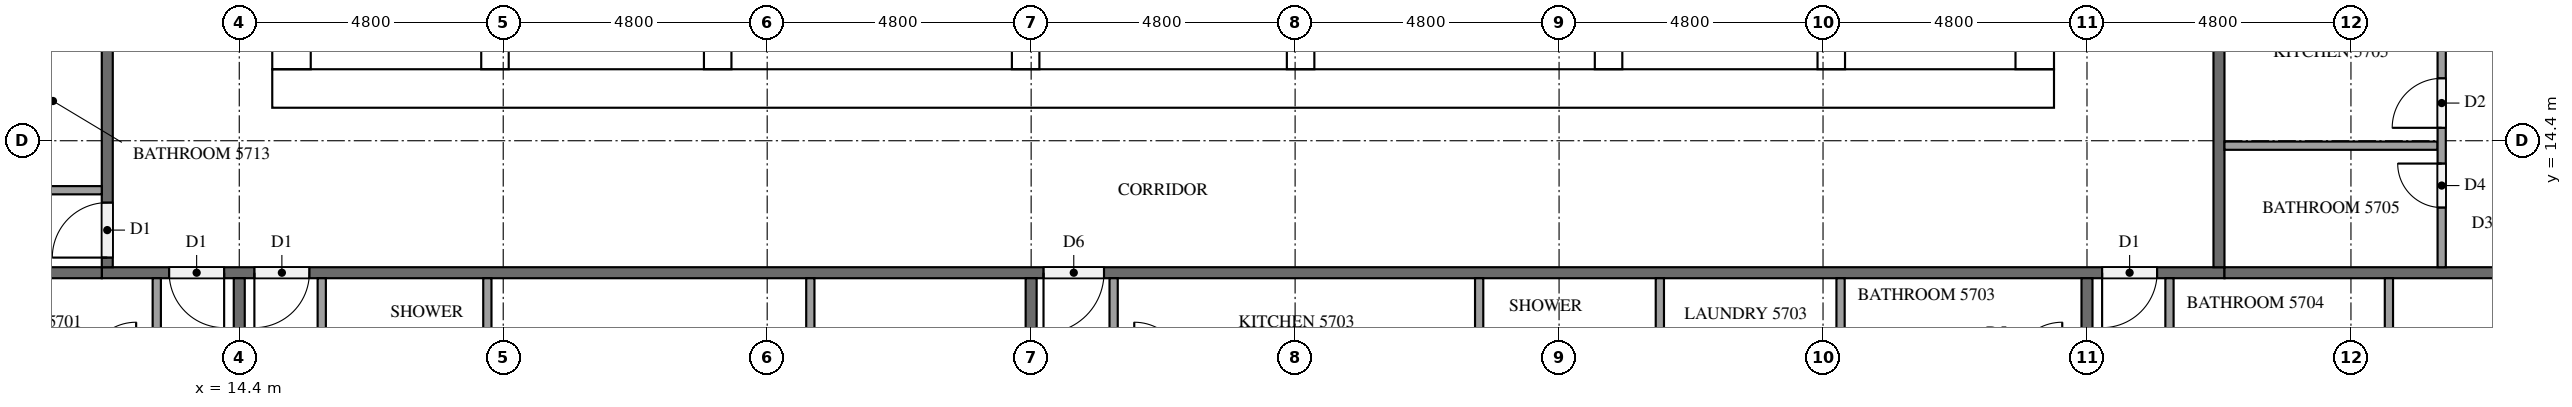
"""IFC4 building model, lengths in metres.
Left out: names, types, materials, properties, quantities, classifications, styles, units other than length and angle.
Written with IfcOpenShell. Run it as: python <this file> out.ifc"""

import sys

from ifc_helpers import new_model, si_unit, direction, frame, frame_2d, origin, place, context, subcontext, project, spatial, rectangle, extrude, element, fill, save


model = new_model("IFC4")
c1 = context("Model", 3, precision=1e-05, world=origin(), true_north=direction((0.0, 1.0)))
c2 = subcontext(c1, "Body", "Model", "MODEL_VIEW")
j1 = project(units=[si_unit("LENGTHUNIT", "METRE"), si_unit("PLANEANGLEUNIT", "RADIAN")], contexts=[c1])
p1 = place(None, origin())
s1 = spatial("IfcSite", under=j1, at=p1, CompositionType="ELEMENT")
p2 = place(p1, origin())
s2 = spatial("IfcBuilding", under=s1, at=p2, CompositionType="ELEMENT")
p3 = place(p2, frame((0.0, 0.0, 219.3)))
s3 = spatial("IfcBuildingStorey", under=s2, at=p3, CompositionType="ELEMENT", Elevation=219.3)
p4 = place(p3, frame((15.0, 15.35, 0.0), z_axis=(0.0, 0.0, 1.0), x_axis=(1.0, 0.0, 0.0)))
e1 = element("IfcWall", 1, at=p4, inside=s3, PredefinedType="SHEAR", context=c2, shape_type="SweptSolid", body=[
    extrude(rectangle(XDim=32.4, YDim=0.7, at=frame_2d((16.2, 0.0))), origin(), (0.0, 0.0, 1.0), 3.2),
])
p5 = place(p4, frame((15.3, 0.0, 0.0)))
e2 = element("IfcOpeningElement", 2, at=p5, cuts=e1, PredefinedType="OPENING", context=c2, shape_type="SweptSolid", body=[
    extrude(rectangle(XDim=1.8, YDim=2.1, at=frame_2d((0.9, 1.05))), frame((0.0, 0.36, 0.0), z_axis=(0.0, -1.0, 0.0), x_axis=(1.0, 0.0, 0.0)), (0.0, 0.0, 1.0), 0.72),
])
p6 = place(p3, frame((15.35, 15.7, 0.0), z_axis=(0.0, 0.0, 1.0), x_axis=(0.0, 1.0, 0.0)))
e3 = element("IfcWall", 3, at=p6, inside=s3, PredefinedType="SHEAR", context=c2, shape_type="SweptSolid", body=[
    extrude(rectangle(XDim=21.4, YDim=0.7, at=frame_2d((10.7, 0.0))), origin(), (0.0, 0.0, 1.0), 3.2),
])
p7 = place(p6, frame((5.06, 0.0, 0.0)))
e4 = element("IfcOpeningElement", 4, at=p7, cuts=e3, PredefinedType="OPENING", context=c2, shape_type="SweptSolid", body=[
    extrude(rectangle(XDim=1.2, YDim=2.1, at=frame_2d((0.6, 1.05))), frame((0.0, 0.36, 0.0), z_axis=(0.0, -1.0, 0.0), x_axis=(1.0, 0.0, 0.0)), (0.0, 0.0, 1.0), 0.72),
])
p8 = place(p3, frame((47.05, 15.7, 0.0), z_axis=(0.0, 0.0, 1.0), x_axis=(0.0, 1.0, 0.0)))
e5 = element("IfcWall", 5, at=p8, inside=s3, PredefinedType="SHEAR", context=c2, shape_type="SweptSolid", body=[
    extrude(rectangle(XDim=21.4, YDim=0.7, at=frame_2d((10.7, 0.0))), origin(), (0.0, 0.0, 1.0), 3.2),
])
p9 = place(p8, frame((10.4, 0.0, 0.0)))
e6 = element("IfcOpeningElement", 6, at=p9, cuts=e5, PredefinedType="OPENING", context=c2, shape_type="SweptSolid", body=[
    extrude(rectangle(XDim=1.2, YDim=2.1, at=frame_2d((0.6, 1.05))), frame((0.0, 0.36, 0.0), z_axis=(0.0, -1.0, 0.0), x_axis=(1.0, 0.0, 0.0)), (0.0, 0.0, 1.0), 0.72),
])
p10 = place(p3, frame((19.05, 15.7, 0.0), z_axis=(0.0, 0.0, 1.0), x_axis=(0.0, 1.0, 0.0)))
e7 = element("IfcWall", 7, at=p10, inside=s3, PredefinedType="SHEAR", context=c2, shape_type="SweptSolid", body=[
    extrude(rectangle(XDim=15.3, YDim=0.5, at=frame_2d((7.65, 0.0))), origin(), (0.0, 0.0, 1.0), 3.2),
])
p11 = place(p10, frame((9.75, 0.0, 0.0)))
e8 = element("IfcOpeningElement", 8, at=p11, cuts=e7, PredefinedType="OPENING", context=c2, shape_type="SweptSolid", body=[
    extrude(rectangle(XDim=1.1, YDim=2.1, at=frame_2d((0.55, 1.05))), frame((0.0, 0.26, 0.0), z_axis=(0.0, -1.0, 0.0), x_axis=(1.0, 0.0, 0.0)), (0.0, 0.0, 1.0), 0.52),
])
p12 = place(p10, frame((13.25, 0.0, 0.0)))
e9 = element("IfcOpeningElement", 9, at=p12, cuts=e7, PredefinedType="OPENING", context=c2, shape_type="SweptSolid", body=[
    extrude(rectangle(XDim=1.1, YDim=2.1, at=frame_2d((0.55, 1.05))), frame((0.0, 0.26, 0.0), z_axis=(0.0, -1.0, 0.0), x_axis=(1.0, 0.0, 0.0)), (0.0, 0.0, 1.0), 0.52),
])
p13 = place(p10, frame((0.5, 0.0, 0.0)))
e10 = element("IfcOpeningElement", 10, at=p13, cuts=e7, PredefinedType="OPENING", context=c2, shape_type="SweptSolid", body=[
    extrude(rectangle(XDim=1.2, YDim=2.1, at=frame_2d((0.6, 1.05))), frame((0.0, 0.26, 0.0), z_axis=(0.0, -1.0, 0.0), x_axis=(1.0, 0.0, 0.0)), (0.0, 0.0, 1.0), 0.52),
])
p14 = place(p3, frame((23.1, 15.7, 0.0), z_axis=(0.0, 0.0, 1.0), x_axis=(0.0, 1.0, 0.0)))
e11 = element("IfcWall", 11, at=p14, inside=s3, PredefinedType="SHEAR", context=c2, shape_type="SweptSolid", body=[
    extrude(rectangle(XDim=21.4, YDim=0.5, at=frame_2d((10.7, 0.0))), origin(), (0.0, 0.0, 1.0), 3.2),
])
p15 = place(p3, frame((39.3, 15.7, 0.0), z_axis=(0.0, 0.0, 1.0), x_axis=(0.0, 1.0, 0.0)))
e12 = element("IfcWall", 12, at=p15, inside=s3, PredefinedType="SHEAR", context=c2, shape_type="SweptSolid", body=[
    extrude(rectangle(XDim=8.55, YDim=0.5, at=frame_2d((4.275, 0.0))), origin(), (0.0, 0.0, 1.0), 3.2),
])
p16 = place(p3, frame((43.35, 15.7, 0.0), z_axis=(0.0, 0.0, 1.0), x_axis=(0.0, 1.0, 0.0)))
e13 = element("IfcWall", 13, at=p16, inside=s3, PredefinedType="SHEAR", context=c2, shape_type="SweptSolid", body=[
    extrude(rectangle(XDim=8.55, YDim=0.5, at=frame_2d((4.275, 0.0))), origin(), (0.0, 0.0, 1.0), 3.2),
])
p17 = place(p16, frame((0.5, 0.0, 0.0)))
e14 = element("IfcOpeningElement", 14, at=p17, cuts=e13, PredefinedType="OPENING", context=c2, shape_type="SweptSolid", body=[
    extrude(rectangle(XDim=1.2, YDim=2.1, at=frame_2d((0.6, 1.05))), frame((0.0, 0.26, 0.0), z_axis=(0.0, -1.0, 0.0), x_axis=(1.0, 0.0, 0.0)), (0.0, 0.0, 1.0), 0.52),
])
for number, where, z_axis, x_axis in (
    (15, (28.7, 15.7, 0.0), (0.0, 0.0, 1.0), (0.0, 1.0, 0.0)),
    (16, (33.7, 15.7, 0.0), (0.0, 0.0, 1.0), (0.0, 1.0, 0.0)),
):
    element("IfcWall", number, at=place(p3, frame(where, z_axis=z_axis, x_axis=x_axis)), inside=s3, PredefinedType="SHEAR", context=c2, shape_type="SweptSolid", body=[
        extrude(rectangle(XDim=2.8, YDim=0.5, at=frame_2d((1.4, 0.0))), origin(), (0.0, 0.0, 1.0), 3.2),
    ])
p18 = place(p3, frame((50.5, 12.0, 0.0), z_axis=(0.0, 0.0, 1.0), x_axis=(-1.0, 0.0, 0.0)))
e17 = element("IfcWall", 17, at=p18, inside=s3, PredefinedType="PARTITIONING", context=c2, shape_type="SweptSolid", body=[
    extrude(rectangle(XDim=38.6, YDim=0.2, at=frame_2d((19.3, 0.0))), origin(), (0.0, 0.0, 1.0), 3.2),
])
p19 = place(p18, frame((36.375, 0.0, 0.0)))
e18 = element("IfcOpeningElement", 18, at=p19, cuts=e17, PredefinedType="OPENING", context=c2, shape_type="SweptSolid", body=[
    extrude(rectangle(XDim=1.0, YDim=2.1, at=frame_2d((0.5, 1.05))), frame((0.0, 0.11, 0.0), z_axis=(0.0, -1.0, 0.0), x_axis=(1.0, 0.0, 0.0)), (0.0, 0.0, 1.0), 0.22),
])
p20 = place(p18, frame((34.825, 0.0, 0.0)))
e19 = element("IfcOpeningElement", 19, at=p20, cuts=e17, PredefinedType="OPENING", context=c2, shape_type="SweptSolid", body=[
    extrude(rectangle(XDim=1.0, YDim=2.1, at=frame_2d((0.5, 1.05))), frame((0.0, 0.11, 0.0), z_axis=(0.0, -1.0, 0.0), x_axis=(1.0, 0.0, 0.0)), (0.0, 0.0, 1.0), 0.22),
])
p21 = place(p18, frame((20.375, 0.0, 0.0)))
e20 = element("IfcOpeningElement", 20, at=p21, cuts=e17, PredefinedType="OPENING", context=c2, shape_type="SweptSolid", body=[
    extrude(rectangle(XDim=1.1, YDim=2.1, at=frame_2d((0.55, 1.05))), frame((0.0, 0.11, 0.0), z_axis=(0.0, -1.0, 0.0), x_axis=(1.0, 0.0, 0.0)), (0.0, 0.0, 1.0), 0.22),
])
p22 = place(p18, frame((1.225, 0.0, 0.0)))
e21 = element("IfcOpeningElement", 21, at=p22, cuts=e17, PredefinedType="OPENING", context=c2, shape_type="SweptSolid", body=[
    extrude(rectangle(XDim=1.0, YDim=2.1, at=frame_2d((0.5, 1.05))), frame((0.0, 0.11, 0.0), z_axis=(0.0, -1.0, 0.0), x_axis=(1.0, 0.0, 0.0)), (0.0, 0.0, 1.0), 0.22),
])
p23 = place(p3, frame((50.4, 40.7, 0.0), z_axis=(0.0, 0.0, 1.0), x_axis=(0.0, -1.0, 0.0)))
e22 = element("IfcWall", 22, at=p23, inside=s3, PredefinedType="PARTITIONING", context=c2, shape_type="SweptSolid", body=[
    extrude(rectangle(XDim=28.6, YDim=0.2, at=frame_2d((14.3, 0.0))), origin(), (0.0, 0.0, 1.0), 3.2),
])
p24 = place(p23, frame((21.775, 0.0, 0.0)))
e23 = element("IfcOpeningElement", 23, at=p24, cuts=e22, PredefinedType="OPENING", context=c2, shape_type="SweptSolid", body=[
    extrude(rectangle(XDim=1.0, YDim=2.1, at=frame_2d((0.5, 1.05))), frame((0.0, 0.11, 0.0), z_axis=(0.0, -1.0, 0.0), x_axis=(1.0, 0.0, 0.0)), (0.0, 0.0, 1.0), 0.22),
])
p25 = place(p23, frame((7.375, 0.0, 0.0)))
e24 = element("IfcOpeningElement", 24, at=p25, cuts=e22, PredefinedType="OPENING", context=c2, shape_type="SweptSolid", body=[
    extrude(rectangle(XDim=1.0, YDim=2.1, at=frame_2d((0.5, 1.05))), frame((0.0, 0.11, 0.0), z_axis=(0.0, -1.0, 0.0), x_axis=(1.0, 0.0, 0.0)), (0.0, 0.0, 1.0), 0.22),
])
p26 = place(p23, frame((0.175, 0.0, 0.0)))
e25 = element("IfcOpeningElement", 25, at=p26, cuts=e22, PredefinedType="OPENING", context=c2, shape_type="SweptSolid", body=[
    extrude(rectangle(XDim=1.0, YDim=2.1, at=frame_2d((0.5, 1.05))), frame((0.0, 0.11, 0.0), z_axis=(0.0, -1.0, 0.0), x_axis=(1.0, 0.0, 0.0)), (0.0, 0.0, 1.0), 0.22),
])
p27 = place(p3, frame((12.0, 12.1, 0.0), z_axis=(0.0, 0.0, 1.0), x_axis=(0.0, 1.0, 0.0)))
e26 = element("IfcWall", 26, at=p27, inside=s3, PredefinedType="PARTITIONING", context=c2, shape_type="SweptSolid", body=[
    extrude(rectangle(XDim=28.6, YDim=0.2, at=frame_2d((14.3, 0.0))), origin(), (0.0, 0.0, 1.0), 3.2),
])
p28 = place(p27, frame((9.725, 0.0, 0.0)))
e27 = element("IfcOpeningElement", 27, at=p28, cuts=e26, PredefinedType="OPENING", context=c2, shape_type="SweptSolid", body=[
    extrude(rectangle(XDim=1.1, YDim=2.1, at=frame_2d((0.55, 1.05))), frame((0.0, 0.11, 0.0), z_axis=(0.0, -1.0, 0.0), x_axis=(1.0, 0.0, 0.0)), (0.0, 0.0, 1.0), 0.22),
])
p29 = place(p27, frame((0.175, 0.0, 0.0)))
e28 = element("IfcOpeningElement", 28, at=p29, cuts=e26, PredefinedType="OPENING", context=c2, shape_type="SweptSolid", body=[
    extrude(rectangle(XDim=1.0, YDim=2.1, at=frame_2d((0.5, 1.05))), frame((0.0, 0.11, 0.0), z_axis=(0.0, -1.0, 0.0), x_axis=(1.0, 0.0, 0.0)), (0.0, 0.0, 1.0), 0.22),
])
for number, where, z_axis, x_axis in (
    (29, (14.4, 11.9, 0.0), (0.0, 0.0, 1.0), (0.0, -1.0, 0.0)),
    (30, (4.9, 12.0, 0.0), (0.0, 0.0, 1.0), (1.0, 0.0, 0.0)),
):
    element("IfcWall", number, at=place(p3, frame(where, z_axis=z_axis, x_axis=x_axis)), inside=s3, PredefinedType="PARTITIONING", context=c2, shape_type="SweptSolid", body=[
        extrude(rectangle(XDim=7.0, YDim=0.2, at=frame_2d((3.5, 0.0))), origin(), (0.0, 0.0, 1.0), 3.2),
    ])
for number, where, z_axis, x_axis in (
    (31, (28.8, 11.9, 0.0), (0.0, 0.0, 1.0), (0.0, -1.0, 0.0)),
    (32, (48.0, 11.9, 0.0), (0.0, 0.0, 1.0), (0.0, -1.0, 0.0)),
):
    element("IfcWall", number, at=place(p3, frame(where, z_axis=z_axis, x_axis=x_axis)), inside=s3, PredefinedType="PARTITIONING", context=c2, shape_type="SweptSolid", body=[
        extrude(rectangle(XDim=6.775, YDim=0.2, at=frame_2d((3.387, 0.0))), origin(), (0.0, 0.0, 1.0), 3.2),
    ])
p30 = place(p3, frame((50.5, 12.0, 0.0), z_axis=(0.0, 0.0, 1.0), x_axis=(1.0, 0.0, 0.0)))
e33 = element("IfcWall", 33, at=p30, inside=s3, PredefinedType="PARTITIONING", context=c2, shape_type="SweptSolid", body=[
    extrude(rectangle(XDim=11.8, YDim=0.2, at=frame_2d((5.9, 0.0))), origin(), (0.0, 0.0, 1.0), 3.2),
])
p31 = place(p3, frame((12.9, 11.9, 0.0), z_axis=(0.0, 0.0, 1.0), x_axis=(0.0, -1.0, 0.0)))
e34 = element("IfcWall", 34, at=p31, inside=s3, PredefinedType="PARTITIONING", context=c2, shape_type="SweptSolid", body=[
    extrude(rectangle(XDim=1.775, YDim=0.15, at=frame_2d((0.887, 0.0))), origin(), (0.0, 0.0, 1.0), 3.2),
])
for number, where, z_axis, x_axis in (
    (35, (18.912, 11.9, 0.0), (0.0, 0.0, 1.0), (0.0, -1.0, 0.0)),
    (36, (24.785, 11.9, 0.0), (0.0, 0.0, 1.0), (0.0, -1.0, 0.0)),
):
    element("IfcWall", number, at=place(p3, frame(where, z_axis=z_axis, x_axis=x_axis)), inside=s3, PredefinedType="PARTITIONING", context=c2, shape_type="SweptSolid", body=[
        extrude(rectangle(XDim=2.075, YDim=0.15, at=frame_2d((1.038, 0.0))), origin(), (0.0, 0.0, 1.0), 3.2),
    ])
p32 = place(p3, frame((15.9, 11.9, 0.0), z_axis=(0.0, 0.0, 1.0), x_axis=(0.0, -1.0, 0.0)))
e37 = element("IfcWall", 37, at=p32, inside=s3, PredefinedType="PARTITIONING", context=c2, shape_type="SweptSolid", body=[
    extrude(rectangle(XDim=2.225, YDim=0.15, at=frame_2d((1.112, 0.0))), origin(), (0.0, 0.0, 1.0), 3.2),
])
for number, where, z_axis, x_axis in (
    (38, (36.947, 11.9, 0.0), (0.0, 0.0, 1.0), (0.0, -1.0, 0.0)),
    (39, (40.233, 11.9, 0.0), (0.0, 0.0, 1.0), (0.0, -1.0, 0.0)),
    (40, (43.519, 11.9, 0.0), (0.0, 0.0, 1.0), (0.0, -1.0, 0.0)),
):
    element("IfcWall", number, at=place(p3, frame(where, z_axis=z_axis, x_axis=x_axis)), inside=s3, PredefinedType="PARTITIONING", context=c2, shape_type="SweptSolid", body=[
        extrude(rectangle(XDim=1.625, YDim=0.15, at=frame_2d((0.812, 0.0))), origin(), (0.0, 0.0, 1.0), 3.2),
    ])
for number, where, z_axis, x_axis in (
    (41, (30.3, 11.9, 0.0), (0.0, 0.0, 1.0), (0.0, -1.0, 0.0)),
    (42, (53.49, 11.9, 0.0), (0.0, 0.0, 1.0), (0.0, -1.0, 0.0)),
):
    element("IfcWall", number, at=place(p3, frame(where, z_axis=z_axis, x_axis=x_axis)), inside=s3, PredefinedType="PARTITIONING", context=c2, shape_type="SweptSolid", body=[
        extrude(rectangle(XDim=1.775, YDim=0.15, at=frame_2d((0.887, 0.0))), origin(), (0.0, 0.0, 1.0), 3.2),
    ])
p33 = place(p3, frame((49.5, 11.9, 0.0), z_axis=(0.0, 0.0, 1.0), x_axis=(0.0, -1.0, 0.0)))
e43 = element("IfcWall", 43, at=p33, inside=s3, PredefinedType="PARTITIONING", context=c2, shape_type="SweptSolid", body=[
    extrude(rectangle(XDim=1.925, YDim=0.15, at=frame_2d((0.962, 0.0))), origin(), (0.0, 0.0, 1.0), 3.2),
])
p34 = place(p3, frame((50.5, 14.31, 0.0), z_axis=(0.0, 0.0, 1.0), x_axis=(1.0, 0.0, 0.0)))
e44 = element("IfcWall", 44, at=p34, inside=s3, PredefinedType="PARTITIONING", context=c2, shape_type="SweptSolid", body=[
    extrude(rectangle(XDim=3.875, YDim=0.15, at=frame_2d((1.938, 0.0))), origin(), (0.0, 0.0, 1.0), 3.2),
])
p35 = place(p3, frame((54.45, 12.1, 0.0), z_axis=(0.0, 0.0, 1.0), x_axis=(0.0, 1.0, 0.0)))
e45 = element("IfcWall", 45, at=p35, inside=s3, PredefinedType="PARTITIONING", context=c2, shape_type="SweptSolid", body=[
    extrude(rectangle(XDim=5.525, YDim=0.15, at=frame_2d((2.762, 0.0))), origin(), (0.0, 0.0, 1.0), 3.2),
])
p36 = place(p35, frame((2.535, 0.0, 0.0)))
e46 = element("IfcOpeningElement", 46, at=p36, cuts=e45, PredefinedType="OPENING", context=c2, shape_type="SweptSolid", body=[
    extrude(rectangle(XDim=0.9, YDim=2.1, at=frame_2d((0.45, 1.05))), frame((0.0, 0.085, 0.0), z_axis=(0.0, -1.0, 0.0), x_axis=(1.0, 0.0, 0.0)), (0.0, 0.0, 1.0), 0.17),
])
p37 = place(p35, frame((1.085, 0.0, 0.0)))
e47 = element("IfcOpeningElement", 47, at=p37, cuts=e45, PredefinedType="OPENING", context=c2, shape_type="SweptSolid", body=[
    extrude(rectangle(XDim=0.8, YDim=2.1, at=frame_2d((0.4, 1.05))), frame((0.0, 0.085, 0.0), z_axis=(0.0, -1.0, 0.0), x_axis=(1.0, 0.0, 0.0)), (0.0, 0.0, 1.0), 0.17),
])
p38 = place(p3, frame((11.9, 13.5, 0.0), z_axis=(0.0, 0.0, 1.0), x_axis=(-1.0, 0.0, 0.0)))
e48 = element("IfcWall", 48, at=p38, inside=s3, PredefinedType="PARTITIONING", context=c2, shape_type="SweptSolid", body=[
    extrude(rectangle(XDim=1.925, YDim=0.15, at=frame_2d((0.962, 0.0))), origin(), (0.0, 0.0, 1.0), 3.2),
])
p39 = place(p5, frame((1.8, 0.0, 0.0), z_axis=(0.0, 0.0, 1.0), x_axis=(-1.0, 0.0, 0.0)))
e49 = element("IfcDoor", 49, at=p39, inside=s3, OperationType="DOUBLE_DOOR_SINGLE_SWING", PredefinedType="DOOR", context=c2, shape_type="SweptSolid", body=[
    extrude(rectangle(XDim=1.8, YDim=2.1, at=frame_2d((0.9, 1.05))), frame((0.0, 0.025, 0.0), z_axis=(0.0, -1.0, 0.0), x_axis=(1.0, 0.0, 0.0)), (0.0, 0.0, 1.0), 0.05),
])
fill(e2, e49)
p40 = place(p19, origin())
e50 = element("IfcDoor", 50, at=p40, inside=s3, OperationType="SINGLE_SWING_LEFT", PredefinedType="DOOR", context=c2, shape_type="SweptSolid", body=[
    extrude(rectangle(XDim=1.0, YDim=2.1, at=frame_2d((0.5, 1.05))), frame((0.0, 0.025, 0.0), z_axis=(0.0, -1.0, 0.0), x_axis=(1.0, 0.0, 0.0)), (0.0, 0.0, 1.0), 0.05),
])
fill(e18, e50)
p41 = place(p20, origin())
e51 = element("IfcDoor", 51, at=p41, inside=s3, OperationType="SINGLE_SWING_RIGHT", PredefinedType="DOOR", context=c2, shape_type="SweptSolid", body=[
    extrude(rectangle(XDim=1.0, YDim=2.1, at=frame_2d((0.5, 1.05))), frame((0.0, 0.025, 0.0), z_axis=(0.0, -1.0, 0.0), x_axis=(1.0, 0.0, 0.0)), (0.0, 0.0, 1.0), 0.05),
])
fill(e19, e51)
p42 = place(p21, origin())
e52 = element("IfcDoor", 52, at=p42, inside=s3, OperationType="SINGLE_SWING_RIGHT", PredefinedType="DOOR", context=c2, shape_type="SweptSolid", body=[
    extrude(rectangle(XDim=1.1, YDim=2.1, at=frame_2d((0.55, 1.05))), frame((0.0, 0.025, 0.0), z_axis=(0.0, -1.0, 0.0), x_axis=(1.0, 0.0, 0.0)), (0.0, 0.0, 1.0), 0.05),
])
fill(e20, e52)
p43 = place(p22, origin())
e53 = element("IfcDoor", 53, at=p43, inside=s3, OperationType="SINGLE_SWING_RIGHT", PredefinedType="DOOR", context=c2, shape_type="SweptSolid", body=[
    extrude(rectangle(XDim=1.0, YDim=2.1, at=frame_2d((0.5, 1.05))), frame((0.0, 0.025, 0.0), z_axis=(0.0, -1.0, 0.0), x_axis=(1.0, 0.0, 0.0)), (0.0, 0.0, 1.0), 0.05),
])
fill(e21, e53)
p44 = place(p29, origin())
e54 = element("IfcDoor", 54, at=p44, inside=s3, OperationType="SINGLE_SWING_LEFT", PredefinedType="DOOR", context=c2, shape_type="SweptSolid", body=[
    extrude(rectangle(XDim=1.0, YDim=2.1, at=frame_2d((0.5, 1.05))), frame((0.0, 0.025, 0.0), z_axis=(0.0, -1.0, 0.0), x_axis=(1.0, 0.0, 0.0)), (0.0, 0.0, 1.0), 0.05),
])
fill(e28, e54)
p45 = place(p36, origin())
e55 = element("IfcDoor", 55, at=p45, inside=s3, OperationType="SINGLE_SWING_LEFT", PredefinedType="DOOR", context=c2, shape_type="SweptSolid", body=[
    extrude(rectangle(XDim=0.9, YDim=2.1, at=frame_2d((0.45, 1.05))), frame((0.0, 0.025, 0.0), z_axis=(0.0, -1.0, 0.0), x_axis=(1.0, 0.0, 0.0)), (0.0, 0.0, 1.0), 0.05),
])
fill(e46, e55)
p46 = place(p37, origin())
e56 = element("IfcDoor", 56, at=p46, inside=s3, OperationType="SINGLE_SWING_RIGHT", PredefinedType="DOOR", context=c2, shape_type="SweptSolid", body=[
    extrude(rectangle(XDim=0.8, YDim=2.1, at=frame_2d((0.4, 1.05))), frame((0.0, 0.025, 0.0), z_axis=(0.0, -1.0, 0.0), x_axis=(1.0, 0.0, 0.0)), (0.0, 0.0, 1.0), 0.05),
])
fill(e47, e56)
save(model, sys.argv[1])
